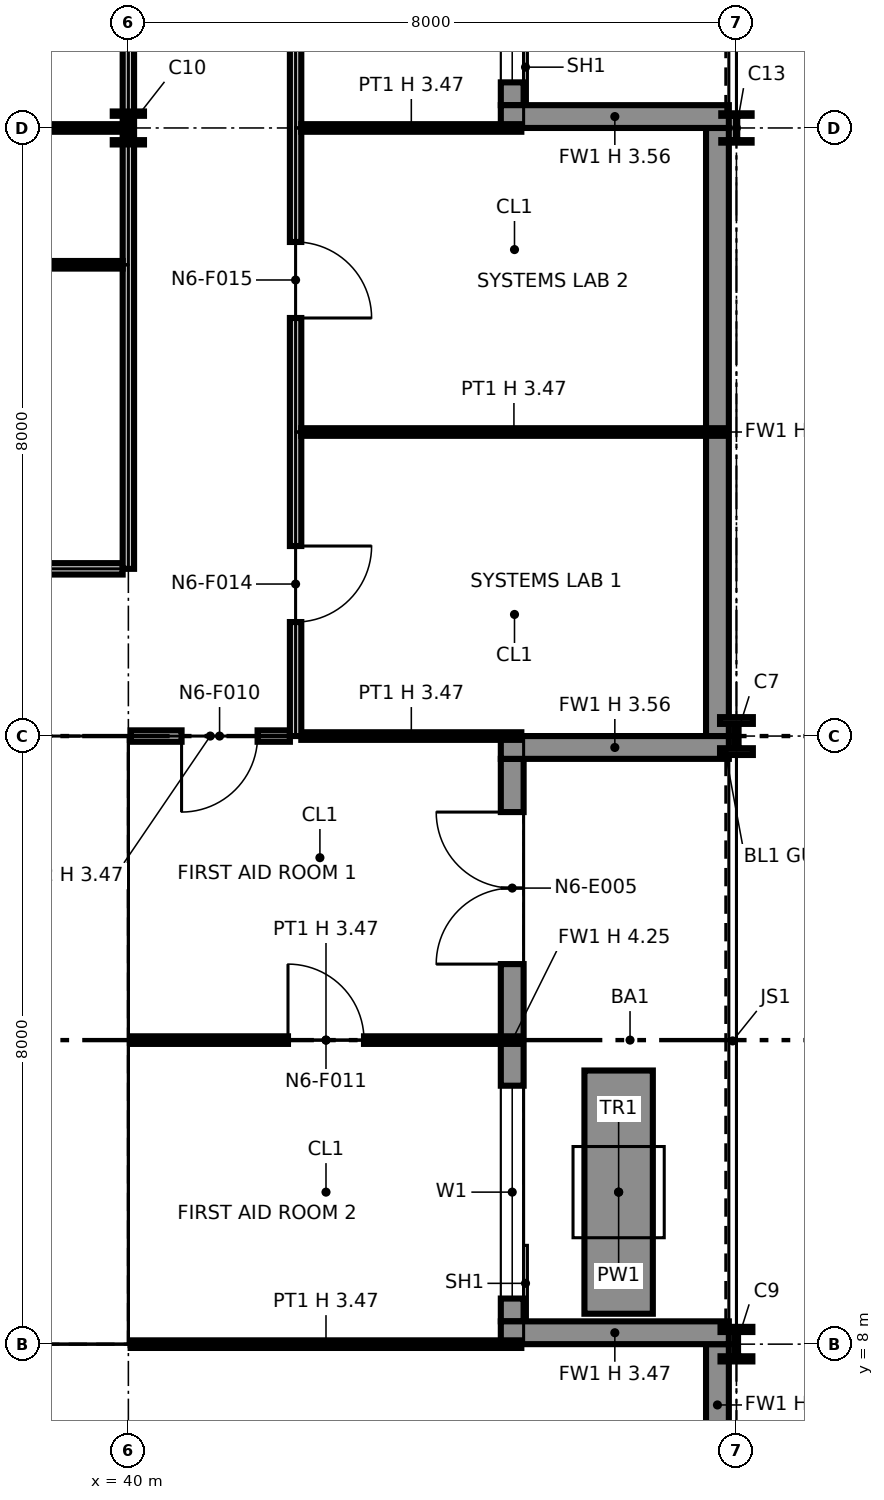
"""IFC4 building model, lengths in metres.
Left out: names, types, materials, properties, quantities, classifications, styles, units other than length and angle.
Written with IfcOpenShell. Run it as: python <this file> out.ifc"""

import sys

from ifc_helpers import new_model, si_unit, direction, frame, frame_2d, origin, origin_2d, place, context, subcontext, project, spatial, polyline, rectangle, i_section, outline, extrude, element, fill, save


model = new_model("IFC4")
c1 = context("Model", 3, precision=1e-05, world=origin(), true_north=direction((0.0, 1.0)))
c2 = subcontext(c1, "Body", "Model", "MODEL_VIEW")
j1 = project(units=[si_unit("LENGTHUNIT", "METRE"), si_unit("PLANEANGLEUNIT", "RADIAN")], contexts=[c1])
p1 = place(None, origin())
s1 = spatial("IfcSite", under=j1, at=p1, CompositionType="ELEMENT")
p2 = place(p1, origin())
s2 = spatial("IfcBuilding", under=s1, at=p2, CompositionType="ELEMENT")
p3 = place(p2, frame((0.0, 0.0, 100.8)))
s3 = spatial("IfcBuildingStorey", under=s2, at=p3, CompositionType="ELEMENT", Elevation=100.8)
for number, where, z_axis, x_axis in (
    (1, (40.0, 8.0, 0.0), (0.0, 0.0, 1.0), (1.0, 0.0, 0.0)),
    (2, (40.0, 16.0, 0.0), (0.0, 0.0, 1.0), (1.0, 0.0, 0.0)),
):
    element("IfcColumn", number, at=place(p3, frame(where, z_axis=z_axis, x_axis=x_axis)), inside=s3, PredefinedType="COLUMN", context=c2, shape_type="SweptSolid", body=[
        extrude(i_section(OverallWidth=0.406, OverallDepth=0.417, WebThickness=0.03, FlangeThickness=0.048, at=origin_2d()), origin(), (0.0, 0.0, 1.0), 4.25),
    ])
p4 = place(p3, frame((40.0, 24.0, 0.0), z_axis=(0.0, 0.0, 1.0), x_axis=(1.0, 0.0, 0.0)))
e3 = element("IfcColumn", 3, at=p4, inside=s3, PredefinedType="COLUMN", context=c2, shape_type="SweptSolid", body=[
    extrude(i_section(OverallWidth=0.411, OverallDepth=0.434, WebThickness=0.036, FlangeThickness=0.057, at=origin_2d()), origin(), (0.0, 0.0, 1.0), 4.25),
])
p5 = place(p3, frame((48.0, 8.0, 0.0), z_axis=(0.0, 0.0, 1.0), x_axis=(1.0, 0.0, 0.0)))
e4 = element("IfcColumn", 4, at=p5, inside=s3, PredefinedType="COLUMN", context=c2, shape_type="SweptSolid", body=[
    extrude(i_section(OverallWidth=0.419, OverallDepth=0.455, WebThickness=0.042, FlangeThickness=0.068, at=origin_2d()), origin(), (0.0, 0.0, 1.0), 4.25),
])
p6 = place(p3, frame((48.0, 16.0, 0.0), z_axis=(0.0, 0.0, 1.0), x_axis=(1.0, 0.0, 0.0)))
e5 = element("IfcColumn", 5, at=p6, inside=s3, PredefinedType="COLUMN", context=c2, shape_type="SweptSolid", body=[
    extrude(i_section(OverallWidth=0.432, OverallDepth=0.498, WebThickness=0.056, FlangeThickness=0.089, at=origin_2d()), origin(), (0.0, 0.0, 1.0), 4.25),
])
p7 = place(p3, frame((48.0, 24.0, 0.0), z_axis=(0.0, 0.0, 1.0), x_axis=(1.0, 0.0, 0.0)))
e6 = element("IfcColumn", 6, at=p7, inside=s3, PredefinedType="COLUMN", context=c2, shape_type="SweptSolid", body=[
    extrude(i_section(OverallWidth=0.399, OverallDepth=0.386, WebThickness=0.021, FlangeThickness=0.033, at=origin_2d()), origin(), (0.0, 0.0, 1.0), 4.25),
])
p8 = place(p3, frame((47.75, 6.4, 0.0), z_axis=(0.0, 0.0, 1.0), x_axis=(0.0, 1.0, 0.0)))
e7 = element("IfcWall", 7, at=p8, inside=s3, PredefinedType="SOLIDWALL", context=c2, shape_type="SweptSolid", body=[
    extrude(rectangle(XDim=1.6, YDim=0.3, at=frame_2d((0.8, 0.0))), origin(), (0.0, 0.0, 1.0), 4.25),
])
p9 = place(p3, frame((45.05, 8.3, 0.0), z_axis=(0.0, 0.0, 1.0), x_axis=(0.0, 1.0, 0.0)))
e8 = element("IfcWall", 8, at=p9, inside=s3, PredefinedType="SOLIDWALL", context=c2, shape_type="SweptSolid", body=[
    extrude(rectangle(XDim=7.4, YDim=0.3, at=frame_2d((3.7, 0.0))), origin(), (0.0, 0.0, 1.0), 4.25),
])
p10 = place(p9, frame((0.3, 0.0, 0.9)))
e9 = element("IfcOpeningElement", 9, at=p10, cuts=e8, PredefinedType="OPENING", context=c2, shape_type="SweptSolid", body=[
    extrude(rectangle(XDim=2.8, YDim=2.2, at=frame_2d((1.4, 1.1))), frame((0.0, 0.16, 0.0), z_axis=(0.0, -1.0, 0.0), x_axis=(1.0, 0.0, 0.0)), (0.0, 0.0, 1.0), 0.32),
])
p11 = place(p9, frame((4.7, 0.0, 0.0)))
e10 = element("IfcOpeningElement", 10, at=p11, cuts=e8, PredefinedType="OPENING", context=c2, shape_type="SweptSolid", body=[
    extrude(rectangle(XDim=2.0, YDim=2.4, at=frame_2d((1.0, 1.2))), frame((0.0, 0.16, 0.0), z_axis=(0.0, -1.0, 0.0), x_axis=(1.0, 0.0, 0.0)), (0.0, 0.0, 1.0), 0.32),
])
p12 = place(p3, frame((47.9, 8.15, 0.0), z_axis=(0.0, 0.0, 1.0), x_axis=(-1.0, 0.0, 0.0)))
e11 = element("IfcWall", 11, at=p12, inside=s3, PredefinedType="SOLIDWALL", context=c2, shape_type="SweptSolid", body=[
    extrude(rectangle(XDim=3.0, YDim=0.3, at=frame_2d((1.5, 0.0))), origin(), (0.0, 0.0, 1.0), 3.469),
])
p13 = place(p3, frame((47.9, 15.85, 0.0), z_axis=(0.0, 0.0, 1.0), x_axis=(-1.0, 0.0, 0.0)))
e12 = element("IfcWall", 12, at=p13, inside=s3, PredefinedType="SOLIDWALL", context=c2, shape_type="SweptSolid", body=[
    extrude(rectangle(XDim=3.0, YDim=0.3, at=frame_2d((1.5, 0.0))), origin(), (0.0, 0.0, 1.0), 3.556),
])
p14 = place(p3, frame((47.75, 16.0, 0.0), z_axis=(0.0, 0.0, 1.0), x_axis=(0.0, 1.0, 0.0)))
e13 = element("IfcWall", 13, at=p14, inside=s3, PredefinedType="SOLIDWALL", context=c2, shape_type="SweptSolid", body=[
    extrude(rectangle(XDim=8.0, YDim=0.3, at=frame_2d((4.0, 0.0))), origin(), (0.0, 0.0, 1.0), 4.25),
])
p15 = place(p3, frame((45.05, 24.3, 0.0), z_axis=(0.0, 0.0, 1.0), x_axis=(0.0, 1.0, 0.0)))
e14 = element("IfcWall", 14, at=p15, inside=s3, PredefinedType="SOLIDWALL", context=c2, shape_type="SweptSolid", body=[
    extrude(rectangle(XDim=7.4, YDim=0.3, at=frame_2d((3.7, 0.0))), origin(), (0.0, 0.0, 1.0), 4.25),
])
p16 = place(p15, frame((0.3, 0.0, 0.9)))
e15 = element("IfcOpeningElement", 15, at=p16, cuts=e14, PredefinedType="OPENING", context=c2, shape_type="SweptSolid", body=[
    extrude(rectangle(XDim=2.8, YDim=2.2, at=frame_2d((1.4, 1.1))), frame((0.0, 0.16, 0.0), z_axis=(0.0, -1.0, 0.0), x_axis=(1.0, 0.0, 0.0)), (0.0, 0.0, 1.0), 0.32),
])
p17 = place(p15, frame((4.7, 0.0, 0.0)))
e16 = element("IfcOpeningElement", 16, at=p17, cuts=e14, PredefinedType="OPENING", context=c2, shape_type="SweptSolid", body=[
    extrude(rectangle(XDim=2.0, YDim=2.4, at=frame_2d((1.0, 1.2))), frame((0.0, 0.16, 0.0), z_axis=(0.0, -1.0, 0.0), x_axis=(1.0, 0.0, 0.0)), (0.0, 0.0, 1.0), 0.32),
])
p18 = place(p3, frame((47.9, 24.15, 0.0), z_axis=(0.0, 0.0, 1.0), x_axis=(-1.0, 0.0, 0.0)))
e17 = element("IfcWall", 17, at=p18, inside=s3, PredefinedType="SOLIDWALL", context=c2, shape_type="SweptSolid", body=[
    extrude(rectangle(XDim=3.0, YDim=0.3, at=frame_2d((1.5, 0.0))), origin(), (0.0, 0.0, 1.0), 3.556),
])
p19 = place(p3, frame((46.45, 8.4, 0.0), z_axis=(0.0, 0.0, 1.0), x_axis=(0.0, 1.0, 0.0)))
e18 = element("IfcWall", 18, at=p19, inside=s3, PredefinedType="SOLIDWALL", context=c2, shape_type="SweptSolid", body=[
    extrude(rectangle(XDim=3.2, YDim=0.9, at=frame_2d((1.6, 0.0))), origin(), (0.0, 0.0, 1.0), 0.6),
])
p20 = place(p3, frame((24.65, 8.75, 0.0), z_axis=(0.0, 0.0, 1.0), x_axis=(1.0, 0.0, 0.0)))
e19 = element("IfcWall", 19, at=p20, inside=s3, PredefinedType="PARTITIONING", context=c2, shape_type="SweptSolid", body=[
    extrude(outline(polyline([(0.0, 0.0), (14.7, 0.0), (14.7, 4.25), (7.469, 4.25), (7.469, 3.632), (7.231, 3.632), (7.23, 4.25), (0.0, 4.25), (0.0, 0.0)])), frame((0.0, 0.1, 0.0), z_axis=(0.0, -1.0, 0.0), x_axis=(1.0, 0.0, 0.0)), (0.0, 0.0, 1.0), 0.2),
])
p21 = place(p3, frame((24.65, 15.25, 0.0), z_axis=(0.0, 0.0, 1.0), x_axis=(1.0, 0.0, 0.0)))
e20 = element("IfcWall", 20, at=p21, inside=s3, PredefinedType="PARTITIONING", context=c2, shape_type="SweptSolid", body=[
    extrude(outline(polyline([(0.0, 0.0), (14.7, 0.0), (14.7, 4.25), (7.469, 4.25), (7.469, 3.632), (7.231, 3.632), (7.23, 4.25), (0.0, 4.25), (0.0, 0.0)])), frame((0.0, 0.1, 0.0), z_axis=(0.0, -1.0, 0.0), x_axis=(1.0, 0.0, 0.0)), (0.0, 0.0, 1.0), 0.2),
])
p22 = place(p21, frame((2.85, 0.0, 0.0)))
e21 = element("IfcOpeningElement", 21, at=p22, cuts=e20, PredefinedType="OPENING", context=c2, shape_type="SweptSolid", body=[
    extrude(rectangle(XDim=1.8, YDim=2.1, at=frame_2d((0.9, 1.05))), frame((0.0, 0.11, 0.0), z_axis=(0.0, -1.0, 0.0), x_axis=(1.0, 0.0, 0.0)), (0.0, 0.0, 1.0), 0.22),
])
p23 = place(p21, frame((9.95, 0.0, 0.0), z_axis=(0.0, 0.0, 1.0), x_axis=(-1.0, 0.0, 0.0)))
e22 = element("IfcOpeningElement", 22, at=p23, cuts=e20, PredefinedType="OPENING", context=c2, shape_type="SweptSolid", body=[
    extrude(rectangle(XDim=1.4, YDim=2.1, at=frame_2d((0.7, 1.05))), frame((0.0, 0.11, 0.0), z_axis=(0.0, -1.0, 0.0), x_axis=(1.0, 0.0, 0.0)), (0.0, 0.0, 1.0), 0.22),
])
p24 = place(p21, frame((13.4, 0.0, 0.0), z_axis=(0.0, 0.0, 1.0), x_axis=(-1.0, 0.0, 0.0)))
e23 = element("IfcOpeningElement", 23, at=p24, cuts=e20, PredefinedType="OPENING", context=c2, shape_type="SweptSolid", body=[
    extrude(rectangle(XDim=1.4, YDim=2.1, at=frame_2d((0.7, 1.05))), frame((0.0, 0.11, 0.0), z_axis=(0.0, -1.0, 0.0), x_axis=(1.0, 0.0, 0.0)), (0.0, 0.0, 1.0), 0.22),
])
p25 = place(p3, frame((39.25, 8.85, 0.0), z_axis=(0.0, 0.0, 1.0), x_axis=(0.0, 1.0, 0.0)))
e24 = element("IfcWall", 24, at=p25, inside=s3, PredefinedType="PARTITIONING", context=c2, shape_type="SweptSolid", body=[
    extrude(rectangle(XDim=6.3, YDim=0.2, at=frame_2d((3.15, 0.0))), origin(), (0.0, 0.0, 1.0), 4.25),
])
p26 = place(p3, frame((40.03, 8.0, 0.0), z_axis=(0.0, 0.0, 1.0), x_axis=(1.0, 0.0, 0.0)))
e25 = element("IfcWall", 25, at=p26, inside=s3, PredefinedType="PARTITIONING", context=c2, shape_type="SweptSolid", body=[
    extrude(rectangle(XDim=5.14, YDim=0.1, at=frame_2d((2.57, 0.0))), origin(), (0.0, 0.0, 1.0), 3.47),
])
p27 = place(p3, frame((40.03, 12.0, 0.0), z_axis=(0.0, 0.0, 1.0), x_axis=(1.0, 0.0, 0.0)))
e26 = element("IfcWall", 26, at=p27, inside=s3, PredefinedType="PARTITIONING", context=c2, shape_type="SweptSolid", body=[
    extrude(rectangle(XDim=5.14, YDim=0.1, at=frame_2d((2.57, 0.0))), origin(), (0.0, 0.0, 1.0), 3.47),
])
p28 = place(p27, frame((2.07, 0.0, 0.0)))
e27 = element("IfcOpeningElement", 27, at=p28, cuts=e26, PredefinedType="OPENING", context=c2, shape_type="SweptSolid", body=[
    extrude(rectangle(XDim=1.0, YDim=2.1, at=frame_2d((0.5, 1.05))), frame((0.0, 0.06, 0.0), z_axis=(0.0, -1.0, 0.0), x_axis=(1.0, 0.0, 0.0)), (0.0, 0.0, 1.0), 0.12),
])
p29 = place(p3, frame((40.03, 16.0, 0.0), z_axis=(0.0, 0.0, 1.0), x_axis=(1.0, 0.0, 0.0)))
e28 = element("IfcWall", 28, at=p29, inside=s3, PredefinedType="PARTITIONING", context=c2, shape_type="SweptSolid", body=[
    extrude(rectangle(XDim=2.095, YDim=0.15, at=frame_2d((1.047, 0.0))), origin(), (0.0, 0.0, 1.0), 3.47),
])
p30 = place(p29, frame((1.67, 0.0, 0.0), z_axis=(0.0, 0.0, 1.0), x_axis=(-1.0, 0.0, 0.0)))
e29 = element("IfcOpeningElement", 29, at=p30, cuts=e28, PredefinedType="OPENING", context=c2, shape_type="SweptSolid", body=[
    extrude(rectangle(XDim=1.0, YDim=2.1, at=frame_2d((0.5, 1.05))), frame((0.0, 0.085, 0.0), z_axis=(0.0, -1.0, 0.0), x_axis=(1.0, 0.0, 0.0)), (0.0, 0.0, 1.0), 0.17),
])
p31 = place(p3, frame((42.275, 16.0, 0.0), z_axis=(0.0, 0.0, 1.0), x_axis=(1.0, 0.0, 0.0)))
e30 = element("IfcWall", 30, at=p31, inside=s3, PredefinedType="PARTITIONING", context=c2, shape_type="SweptSolid", body=[
    extrude(rectangle(XDim=2.895, YDim=0.1, at=frame_2d((1.448, 0.0))), origin(), (0.0, 0.0, 1.0), 3.47),
])
p32 = place(p3, frame((42.2, 16.0, 0.0), z_axis=(0.0, 0.0, 1.0), x_axis=(0.0, 1.0, 0.0)))
e31 = element("IfcWall", 31, at=p32, inside=s3, PredefinedType="PARTITIONING", context=c2, shape_type="SweptSolid", body=[
    extrude(outline(polyline([(0.0, 0.0), (26.125, 0.0), (26.125, 4.25), (24.3, 4.25), (24.298, 3.47), (23.702, 3.47), (23.7, 4.25), (20.3, 4.25), (20.298, 3.47), (19.702, 3.47), (19.7, 4.25), (16.3, 4.25), (16.298, 3.47), (15.702, 3.47), (15.7, 4.25), (12.3, 4.25), (12.298, 3.47), (11.702, 3.47), (11.7, 4.25), (8.3, 4.25), (8.298, 3.47), (7.702, 3.47), (7.7, 4.25), (4.3, 4.25), (4.298, 3.47), (3.702, 3.47), (3.7, 4.25), (0.0, 4.25), (0.0, 0.0)])), frame((0.0, 0.075, 0.0), z_axis=(0.0, -1.0, 0.0), x_axis=(1.0, 0.0, 0.0)), (0.0, 0.0, 1.0), 0.15),
])
p33 = place(p32, frame((2.5, 0.0, 0.0), z_axis=(0.0, 0.0, 1.0), x_axis=(-1.0, 0.0, 0.0)))
e32 = element("IfcOpeningElement", 32, at=p33, cuts=e31, PredefinedType="OPENING", context=c2, shape_type="SweptSolid", body=[
    extrude(rectangle(XDim=1.0, YDim=2.1, at=frame_2d((0.5, 1.05))), frame((0.0, 0.085, 0.0), z_axis=(0.0, -1.0, 0.0), x_axis=(1.0, 0.0, 0.0)), (0.0, 0.0, 1.0), 0.17),
])
p34 = place(p32, frame((6.5, 0.0, 0.0), z_axis=(0.0, 0.0, 1.0), x_axis=(-1.0, 0.0, 0.0)))
e33 = element("IfcOpeningElement", 33, at=p34, cuts=e31, PredefinedType="OPENING", context=c2, shape_type="SweptSolid", body=[
    extrude(rectangle(XDim=1.0, YDim=2.1, at=frame_2d((0.5, 1.05))), frame((0.0, 0.085, 0.0), z_axis=(0.0, -1.0, 0.0), x_axis=(1.0, 0.0, 0.0)), (0.0, 0.0, 1.0), 0.17),
])
p35 = place(p32, frame((12.5, 0.0, 0.0), z_axis=(0.0, 0.0, 1.0), x_axis=(-1.0, 0.0, 0.0)))
e34 = element("IfcOpeningElement", 34, at=p35, cuts=e31, PredefinedType="OPENING", context=c2, shape_type="SweptSolid", body=[
    extrude(rectangle(XDim=1.0, YDim=2.1, at=frame_2d((0.5, 1.05))), frame((0.0, 0.085, 0.0), z_axis=(0.0, -1.0, 0.0), x_axis=(1.0, 0.0, 0.0)), (0.0, 0.0, 1.0), 0.17),
])
p36 = place(p32, frame((18.5, 0.0, 0.0), z_axis=(0.0, 0.0, 1.0), x_axis=(-1.0, 0.0, 0.0)))
e35 = element("IfcOpeningElement", 35, at=p36, cuts=e31, PredefinedType="OPENING", context=c2, shape_type="SweptSolid", body=[
    extrude(rectangle(XDim=1.0, YDim=2.1, at=frame_2d((0.5, 1.05))), frame((0.0, 0.085, 0.0), z_axis=(0.0, -1.0, 0.0), x_axis=(1.0, 0.0, 0.0)), (0.0, 0.0, 1.0), 0.17),
])
p37 = place(p32, frame((22.5, 0.0, 0.0), z_axis=(0.0, 0.0, 1.0), x_axis=(-1.0, 0.0, 0.0)))
e36 = element("IfcOpeningElement", 36, at=p37, cuts=e31, PredefinedType="OPENING", context=c2, shape_type="SweptSolid", body=[
    extrude(rectangle(XDim=1.0, YDim=2.1, at=frame_2d((0.5, 1.05))), frame((0.0, 0.085, 0.0), z_axis=(0.0, -1.0, 0.0), x_axis=(1.0, 0.0, 0.0)), (0.0, 0.0, 1.0), 0.17),
])
p38 = place(p32, frame((25.6, 0.0, 0.0), z_axis=(0.0, 0.0, 1.0), x_axis=(-1.0, 0.0, 0.0)))
e37 = element("IfcOpeningElement", 37, at=p38, cuts=e31, PredefinedType="OPENING", context=c2, shape_type="SweptSolid", body=[
    extrude(rectangle(XDim=1.0, YDim=2.1, at=frame_2d((0.5, 1.05))), frame((0.0, 0.085, 0.0), z_axis=(0.0, -1.0, 0.0), x_axis=(1.0, 0.0, 0.0)), (0.0, 0.0, 1.0), 0.17),
])
p39 = place(p3, frame((27.075, 18.2, 0.0), z_axis=(0.0, 0.0, 1.0), x_axis=(1.0, 0.0, 0.0)))
e38 = element("IfcWall", 38, at=p39, inside=s3, PredefinedType="PARTITIONING", context=c2, shape_type="SweptSolid", body=[
    extrude(rectangle(XDim=12.85, YDim=0.15, at=frame_2d((6.425, 0.0))), origin(), (0.0, 0.0, 1.0), 4.25),
])
p40 = place(p39, frame((1.925, 0.0, 0.0)))
e39 = element("IfcOpeningElement", 39, at=p40, cuts=e38, PredefinedType="OPENING", context=c2, shape_type="SweptSolid", body=[
    extrude(rectangle(XDim=1.0, YDim=2.1, at=frame_2d((0.5, 1.05))), frame((0.0, 0.085, 0.0), z_axis=(0.0, -1.0, 0.0), x_axis=(1.0, 0.0, 0.0)), (0.0, 0.0, 1.0), 0.17),
])
p41 = place(p3, frame((40.0, 18.2, 0.0), z_axis=(0.0, 0.0, 1.0), x_axis=(0.0, 1.0, 0.0)))
e40 = element("IfcWall", 40, at=p41, inside=s3, PredefinedType="PARTITIONING", context=c2, shape_type="SweptSolid", body=[
    extrude(rectangle(XDim=13.77, YDim=0.15, at=frame_2d((6.885, 0.0))), origin(), (0.0, 0.0, 1.0), 3.47),
])
p42 = place(p3, frame((42.275, 20.0, 0.0), z_axis=(0.0, 0.0, 1.0), x_axis=(1.0, 0.0, 0.0)))
e41 = element("IfcWall", 41, at=p42, inside=s3, PredefinedType="PARTITIONING", context=c2, shape_type="SweptSolid", body=[
    extrude(rectangle(XDim=5.595, YDim=0.1, at=frame_2d((2.798, 0.0))), origin(), (0.0, 0.0, 1.0), 3.47),
])
p43 = place(p3, frame((27.075, 22.2, 0.0), z_axis=(0.0, 0.0, 1.0), x_axis=(1.0, 0.0, 0.0)))
e42 = element("IfcWall", 42, at=p43, inside=s3, PredefinedType="PARTITIONING", context=c2, shape_type="SweptSolid", body=[
    extrude(rectangle(XDim=12.85, YDim=0.1, at=frame_2d((6.425, 0.0))), origin(), (0.0, 0.0, 1.0), 4.25),
])
p44 = place(p43, frame((6.925, 0.0, 0.0), z_axis=(0.0, 0.0, 1.0), x_axis=(-1.0, 0.0, 0.0)))
e43 = element("IfcOpeningElement", 43, at=p44, cuts=e42, PredefinedType="OPENING", context=c2, shape_type="SweptSolid", body=[
    extrude(rectangle(XDim=1.0, YDim=2.1, at=frame_2d((0.5, 1.05))), frame((0.0, 0.06, 0.0), z_axis=(0.0, -1.0, 0.0), x_axis=(1.0, 0.0, 0.0)), (0.0, 0.0, 1.0), 0.12),
])
p45 = place(p3, frame((27.075, 24.0, 0.0), z_axis=(0.0, 0.0, 1.0), x_axis=(1.0, 0.0, 0.0)))
e44 = element("IfcWall", 44, at=p45, inside=s3, PredefinedType="PARTITIONING", context=c2, shape_type="SweptSolid", body=[
    extrude(rectangle(XDim=12.85, YDim=0.1, at=frame_2d((6.425, 0.0))), origin(), (0.0, 0.0, 1.0), 3.47),
])
p46 = place(p3, frame((42.275, 24.0, 0.0), z_axis=(0.0, 0.0, 1.0), x_axis=(1.0, 0.0, 0.0)))
e45 = element("IfcWall", 45, at=p46, inside=s3, PredefinedType="PARTITIONING", context=c2, shape_type="SweptSolid", body=[
    extrude(rectangle(XDim=2.895, YDim=0.1, at=frame_2d((1.448, 0.0))), origin(), (0.0, 0.0, 1.0), 3.47),
])
p47 = place(p10, origin())
e46 = element("IfcWindow", 46, at=p47, inside=s3, PartitioningType="SINGLE_PANEL", PredefinedType="WINDOW", context=c2, shape_type="SweptSolid", body=[
    extrude(rectangle(XDim=2.8, YDim=2.2, at=frame_2d((1.4, 1.1))), frame((0.0, 0.03, 0.0), z_axis=(0.0, -1.0, 0.0), x_axis=(1.0, 0.0, 0.0)), (0.0, 0.0, 1.0), 0.06),
])
fill(e9, e46)
p48 = place(p11, origin())
e47 = element("IfcDoor", 47, at=p48, inside=s3, OperationType="DOUBLE_DOOR_SINGLE_SWING", PredefinedType="DOOR", context=c2, shape_type="SweptSolid", body=[
    extrude(rectangle(XDim=2.0, YDim=2.4, at=frame_2d((1.0, 1.2))), frame((0.0, 0.025, 0.0), z_axis=(0.0, -1.0, 0.0), x_axis=(1.0, 0.0, 0.0)), (0.0, 0.0, 1.0), 0.05),
])
fill(e10, e47)
p49 = place(p16, origin())
e48 = element("IfcWindow", 48, at=p49, inside=s3, PartitioningType="SINGLE_PANEL", PredefinedType="WINDOW", context=c2, shape_type="SweptSolid", body=[
    extrude(rectangle(XDim=2.8, YDim=2.2, at=frame_2d((1.4, 1.1))), frame((0.0, 0.03, 0.0), z_axis=(0.0, -1.0, 0.0), x_axis=(1.0, 0.0, 0.0)), (0.0, 0.0, 1.0), 0.06),
])
fill(e15, e48)
p50 = place(p30, origin())
e49 = element("IfcDoor", 49, at=p50, inside=s3, OperationType="SINGLE_SWING_RIGHT", PredefinedType="DOOR", context=c2, shape_type="SweptSolid", body=[
    extrude(rectangle(XDim=1.0, YDim=2.1, at=frame_2d((0.5, 1.05))), frame((0.0, 0.025, 0.0), z_axis=(0.0, -1.0, 0.0), x_axis=(1.0, 0.0, 0.0)), (0.0, 0.0, 1.0), 0.05),
])
fill(e29, e49)
p51 = place(p28, origin())
e50 = element("IfcDoor", 50, at=p51, inside=s3, OperationType="SINGLE_SWING_LEFT", PredefinedType="DOOR", context=c2, shape_type="SweptSolid", body=[
    extrude(rectangle(XDim=1.0, YDim=2.1, at=frame_2d((0.5, 1.05))), frame((0.0, 0.025, 0.0), z_axis=(0.0, -1.0, 0.0), x_axis=(1.0, 0.0, 0.0)), (0.0, 0.0, 1.0), 0.05),
])
fill(e27, e50)
p52 = place(p33, origin())
e51 = element("IfcDoor", 51, at=p52, inside=s3, OperationType="SINGLE_SWING_LEFT", PredefinedType="DOOR", context=c2, shape_type="SweptSolid", body=[
    extrude(rectangle(XDim=1.0, YDim=2.1, at=frame_2d((0.5, 1.05))), frame((0.0, 0.025, 0.0), z_axis=(0.0, -1.0, 0.0), x_axis=(1.0, 0.0, 0.0)), (0.0, 0.0, 1.0), 0.05),
])
fill(e32, e51)
p53 = place(p34, origin())
e52 = element("IfcDoor", 52, at=p53, inside=s3, OperationType="SINGLE_SWING_RIGHT", PredefinedType="DOOR", context=c2, shape_type="SweptSolid", body=[
    extrude(rectangle(XDim=1.0, YDim=2.1, at=frame_2d((0.5, 1.05))), frame((0.0, 0.025, 0.0), z_axis=(0.0, -1.0, 0.0), x_axis=(1.0, 0.0, 0.0)), (0.0, 0.0, 1.0), 0.05),
])
fill(e33, e52)
save(model, sys.argv[1])
